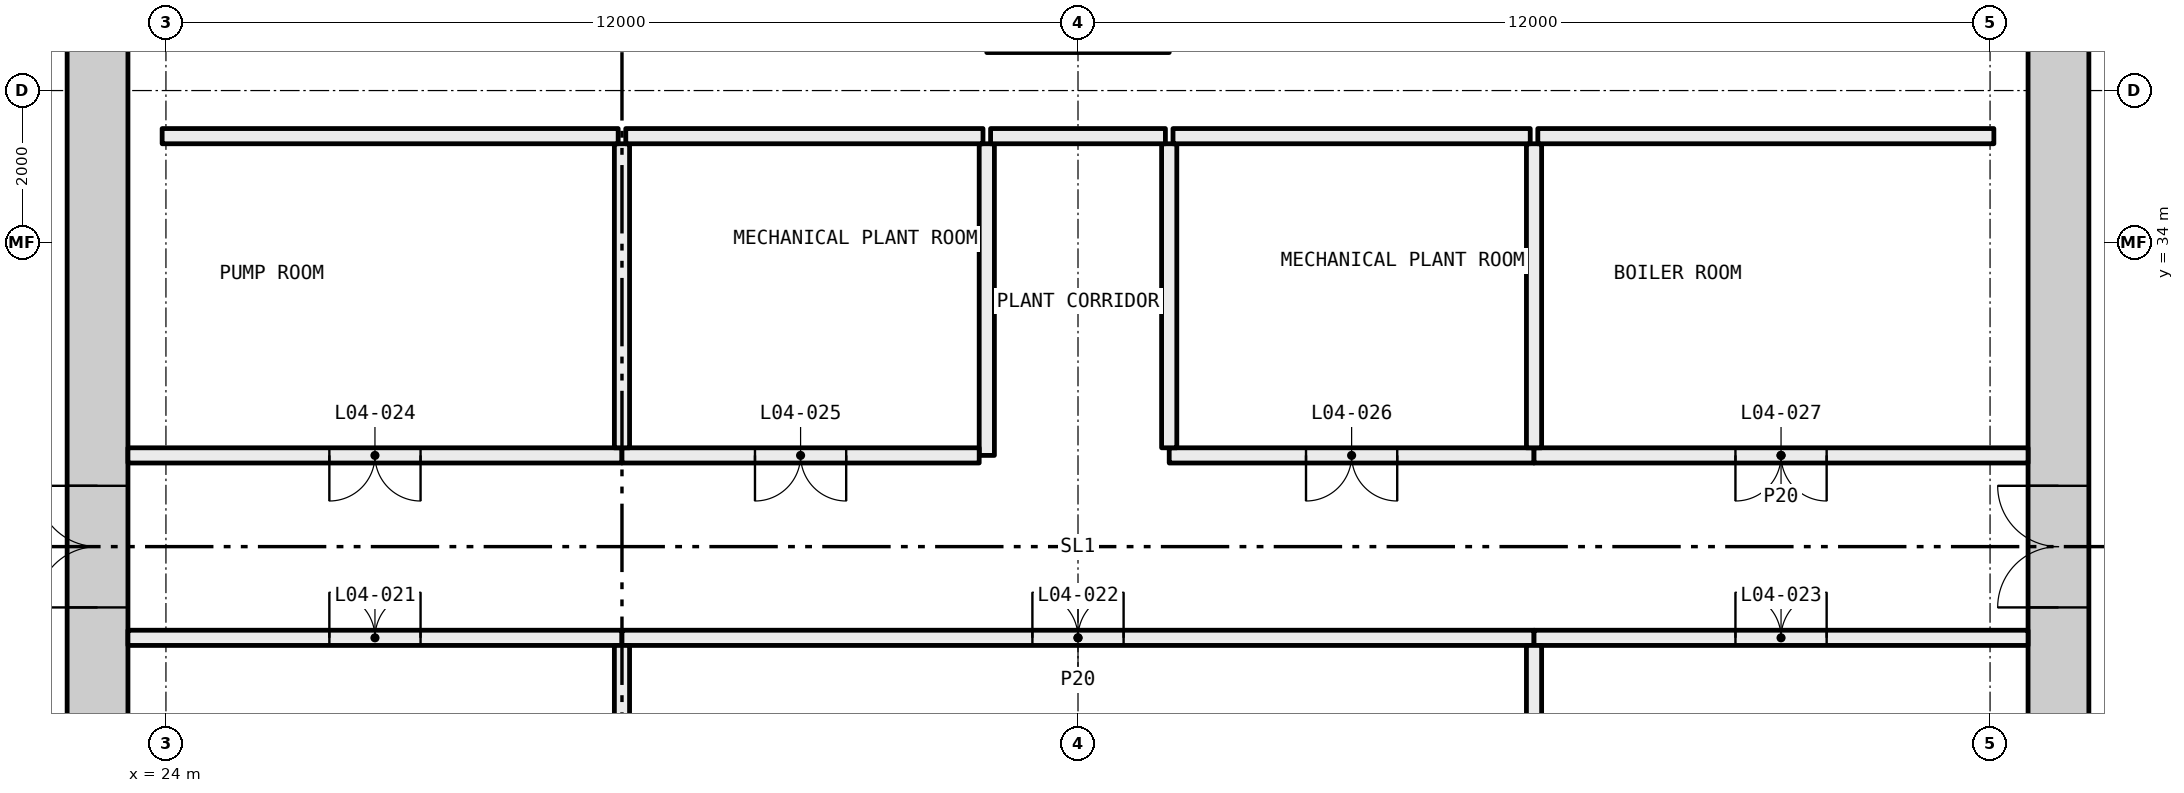
"""IFC4 building model, lengths in metres.
Left out: names, types, materials, properties, quantities, classifications, styles, units other than length and angle.
Written with IfcOpenShell. Run it as: python <this file> out.ifc"""

import sys

from ifc_helpers import new_model, si_unit, direction, frame, frame_2d, origin, place, context, subcontext, project, spatial, rectangle, extrude, element, fill, save


model = new_model("IFC4")
c1 = context("Model", 3, precision=1e-05, world=origin(), true_north=direction((0.0, 1.0)))
c2 = subcontext(c1, "Body", "Model", "MODEL_VIEW")
j1 = project(units=[si_unit("LENGTHUNIT", "METRE"), si_unit("PLANEANGLEUNIT", "RADIAN")], contexts=[c1])
p1 = place(None, origin())
s1 = spatial("IfcSite", under=j1, at=p1, CompositionType="ELEMENT")
p2 = place(p1, origin())
s2 = spatial("IfcBuilding", under=s1, at=p2, CompositionType="ELEMENT")
p3 = place(p2, frame((0.0, 0.0, 24.0)))
s3 = spatial("IfcBuildingStorey", under=s2, at=p3, CompositionType="ELEMENT", Elevation=24.0)
p4 = place(p3, frame((23.5, 28.8, 0.0), z_axis=(0.0, 0.0, 1.0), x_axis=(1.0, 0.0, 0.0)))
e1 = element("IfcWall", 1, at=p4, inside=s3, PredefinedType="PARTITIONING", context=c2, shape_type="SweptSolid", body=[
    extrude(rectangle(XDim=6.5, YDim=0.2, at=frame_2d((3.25, 0.0))), origin(), (0.0, 0.0, 1.0), 5.6),
])
p5 = place(p4, frame((2.65, 0.0, 0.0)))
e2 = element("IfcOpeningElement", 2, at=p5, cuts=e1, PredefinedType="OPENING", context=c2, shape_type="SweptSolid", body=[
    extrude(rectangle(XDim=1.2, YDim=2.1, at=frame_2d((0.6, 1.05))), frame((0.0, 0.11, 0.0), z_axis=(0.0, -1.0, 0.0), x_axis=(1.0, 0.0, 0.0)), (0.0, 0.0, 1.0), 0.22),
])
p6 = place(p3, frame((30.0, 28.8, 0.0), z_axis=(0.0, 0.0, 1.0), x_axis=(1.0, 0.0, 0.0)))
e3 = element("IfcWall", 3, at=p6, inside=s3, PredefinedType="PARTITIONING", context=c2, shape_type="SweptSolid", body=[
    extrude(rectangle(XDim=12.0, YDim=0.2, at=frame_2d((6.0, 0.0))), origin(), (0.0, 0.0, 1.0), 5.6),
])
p7 = place(p6, frame((5.4, 0.0, 0.0)))
e4 = element("IfcOpeningElement", 4, at=p7, cuts=e3, PredefinedType="OPENING", context=c2, shape_type="SweptSolid", body=[
    extrude(rectangle(XDim=1.2, YDim=2.1, at=frame_2d((0.6, 1.05))), frame((0.0, 0.11, 0.0), z_axis=(0.0, -1.0, 0.0), x_axis=(1.0, 0.0, 0.0)), (0.0, 0.0, 1.0), 0.22),
])
p8 = place(p3, frame((42.0, 28.8, 0.0), z_axis=(0.0, 0.0, 1.0), x_axis=(1.0, 0.0, 0.0)))
e5 = element("IfcWall", 5, at=p8, inside=s3, PredefinedType="PARTITIONING", context=c2, shape_type="SweptSolid", body=[
    extrude(rectangle(XDim=6.5, YDim=0.2, at=frame_2d((3.25, 0.0))), origin(), (0.0, 0.0, 1.0), 5.6),
])
p9 = place(p8, frame((2.65, 0.0, 0.0)))
e6 = element("IfcOpeningElement", 6, at=p9, cuts=e5, PredefinedType="OPENING", context=c2, shape_type="SweptSolid", body=[
    extrude(rectangle(XDim=1.2, YDim=2.1, at=frame_2d((0.6, 1.05))), frame((0.0, 0.11, 0.0), z_axis=(0.0, -1.0, 0.0), x_axis=(1.0, 0.0, 0.0)), (0.0, 0.0, 1.0), 0.22),
])
p10 = place(p3, frame((30.0, 31.2, 0.0), z_axis=(0.0, 0.0, 1.0), x_axis=(-1.0, 0.0, 0.0)))
e7 = element("IfcWall", 7, at=p10, inside=s3, PredefinedType="PARTITIONING", context=c2, shape_type="SweptSolid", body=[
    extrude(rectangle(XDim=6.5, YDim=0.2, at=frame_2d((3.25, 0.0))), origin(), (0.0, 0.0, 1.0), 5.6),
])
p11 = place(p10, frame((2.65, 0.0, 0.0)))
e8 = element("IfcOpeningElement", 8, at=p11, cuts=e7, PredefinedType="OPENING", context=c2, shape_type="SweptSolid", body=[
    extrude(rectangle(XDim=1.2, YDim=2.1, at=frame_2d((0.6, 1.05))), frame((0.0, 0.11, 0.0), z_axis=(0.0, -1.0, 0.0), x_axis=(1.0, 0.0, 0.0)), (0.0, 0.0, 1.0), 0.22),
])
p12 = place(p3, frame((34.8, 35.3, 0.0), z_axis=(0.0, 0.0, 1.0), x_axis=(0.0, -1.0, 0.0)))
e9 = element("IfcWall", 9, at=p12, inside=s3, PredefinedType="PARTITIONING", context=c2, shape_type="SweptSolid", body=[
    extrude(rectangle(XDim=4.1, YDim=0.2, at=frame_2d((2.05, 0.0))), origin(), (0.0, 0.0, 1.0), 5.6),
])
p13 = place(p3, frame((34.7, 31.2, 0.0), z_axis=(0.0, 0.0, 1.0), x_axis=(-1.0, 0.0, 0.0)))
e10 = element("IfcWall", 10, at=p13, inside=s3, PredefinedType="PARTITIONING", context=c2, shape_type="SweptSolid", body=[
    extrude(rectangle(XDim=4.7, YDim=0.2, at=frame_2d((2.35, 0.0))), origin(), (0.0, 0.0, 1.0), 5.6),
])
p14 = place(p13, frame((1.75, 0.0, 0.0)))
e11 = element("IfcOpeningElement", 11, at=p14, cuts=e10, PredefinedType="OPENING", context=c2, shape_type="SweptSolid", body=[
    extrude(rectangle(XDim=1.2, YDim=2.1, at=frame_2d((0.6, 1.05))), frame((0.0, 0.11, 0.0), z_axis=(0.0, -1.0, 0.0), x_axis=(1.0, 0.0, 0.0)), (0.0, 0.0, 1.0), 0.22),
])
p15 = place(p3, frame((42.0, 31.2, 0.0), z_axis=(0.0, 0.0, 1.0), x_axis=(-1.0, 0.0, 0.0)))
e12 = element("IfcWall", 12, at=p15, inside=s3, PredefinedType="PARTITIONING", context=c2, shape_type="SweptSolid", body=[
    extrude(rectangle(XDim=4.8, YDim=0.2, at=frame_2d((2.4, 0.0))), origin(), (0.0, 0.0, 1.0), 5.6),
])
p16 = place(p15, frame((1.8, 0.0, 0.0)))
e13 = element("IfcOpeningElement", 13, at=p16, cuts=e12, PredefinedType="OPENING", context=c2, shape_type="SweptSolid", body=[
    extrude(rectangle(XDim=1.2, YDim=2.1, at=frame_2d((0.6, 1.05))), frame((0.0, 0.11, 0.0), z_axis=(0.0, -1.0, 0.0), x_axis=(1.0, 0.0, 0.0)), (0.0, 0.0, 1.0), 0.22),
])
p17 = place(p3, frame((37.2, 31.3, 0.0), z_axis=(0.0, 0.0, 1.0), x_axis=(0.0, 1.0, 0.0)))
e14 = element("IfcWall", 14, at=p17, inside=s3, PredefinedType="PARTITIONING", context=c2, shape_type="SweptSolid", body=[
    extrude(rectangle(XDim=4.0, YDim=0.2, at=frame_2d((2.0, 0.0))), origin(), (0.0, 0.0, 1.0), 5.6),
])
p18 = place(p3, frame((48.5, 31.2, 0.0), z_axis=(0.0, 0.0, 1.0), x_axis=(-1.0, 0.0, 0.0)))
e15 = element("IfcWall", 15, at=p18, inside=s3, PredefinedType="PARTITIONING", context=c2, shape_type="SweptSolid", body=[
    extrude(rectangle(XDim=6.5, YDim=0.2, at=frame_2d((3.25, 0.0))), origin(), (0.0, 0.0, 1.0), 5.6),
])
p19 = place(p18, frame((2.65, 0.0, 0.0)))
e16 = element("IfcOpeningElement", 16, at=p19, cuts=e15, PredefinedType="OPENING", context=c2, shape_type="SweptSolid", body=[
    extrude(rectangle(XDim=1.2, YDim=2.1, at=frame_2d((0.6, 1.05))), frame((0.0, 0.11, 0.0), z_axis=(0.0, -1.0, 0.0), x_axis=(1.0, 0.0, 0.0)), (0.0, 0.0, 1.0), 0.22),
])
for number, where, z_axis, x_axis in (
    (17, (30.0, 24.7, 0.0), (0.0, 0.0, 1.0), (0.0, 1.0, 0.0)),
    (18, (42.0, 24.7, 0.0), (0.0, 0.0, 1.0), (0.0, 1.0, 0.0)),
    (19, (30.0, 31.3, 0.0), (0.0, 0.0, 1.0), (0.0, 1.0, 0.0)),
    (20, (42.0, 31.3, 0.0), (0.0, 0.0, 1.0), (0.0, 1.0, 0.0)),
):
    element("IfcWall", number, at=place(p3, frame(where, z_axis=z_axis, x_axis=x_axis)), inside=s3, PredefinedType="PARTITIONING", context=c2, shape_type="SweptSolid", body=[
        extrude(rectangle(XDim=4.0, YDim=0.2, at=frame_2d((2.0, 0.0))), origin(), (0.0, 0.0, 1.0), 5.6),
    ])
p20 = place(p3, frame((37.15, 35.4, 0.0), z_axis=(0.0, 0.0, 1.0), x_axis=(-1.0, 0.0, 0.0)))
e21 = element("IfcWall", 21, at=p20, inside=s3, PredefinedType="PARTITIONING", context=c2, shape_type="SweptSolid", body=[
    extrude(rectangle(XDim=2.3, YDim=0.2, at=frame_2d((1.15, 0.0))), origin(), (0.0, 0.0, 1.0), 5.6),
])
p21 = place(p3, frame((29.95, 35.4, 0.0), z_axis=(0.0, 0.0, 1.0), x_axis=(-1.0, 0.0, 0.0)))
e22 = element("IfcWall", 22, at=p21, inside=s3, PredefinedType="PARTITIONING", context=c2, shape_type="SweptSolid", body=[
    extrude(rectangle(XDim=6.0, YDim=0.2, at=frame_2d((3.0, 0.0))), origin(), (0.0, 0.0, 1.0), 5.6),
])
for number, where, z_axis, x_axis in (
    (23, (34.75, 35.4, 0.0), (0.0, 0.0, 1.0), (-1.0, 0.0, 0.0)),
    (24, (41.95, 35.4, 0.0), (0.0, 0.0, 1.0), (-1.0, 0.0, 0.0)),
):
    element("IfcWall", number, at=place(p3, frame(where, z_axis=z_axis, x_axis=x_axis)), inside=s3, PredefinedType="PARTITIONING", context=c2, shape_type="SweptSolid", body=[
        extrude(rectangle(XDim=4.7, YDim=0.2, at=frame_2d((2.35, 0.0))), origin(), (0.0, 0.0, 1.0), 5.6),
    ])
p22 = place(p3, frame((48.05, 35.4, 0.0), z_axis=(0.0, 0.0, 1.0), x_axis=(-1.0, 0.0, 0.0)))
e25 = element("IfcWall", 25, at=p22, inside=s3, PredefinedType="PARTITIONING", context=c2, shape_type="SweptSolid", body=[
    extrude(rectangle(XDim=6.0, YDim=0.2, at=frame_2d((3.0, 0.0))), origin(), (0.0, 0.0, 1.0), 5.6),
])
p23 = place(p3, frame((23.1, 22.3, 0.0), z_axis=(0.0, 0.0, 1.0), x_axis=(0.0, 1.0, 0.0)))
e26 = element("IfcWall", 26, at=p23, inside=s3, PredefinedType="SHEAR", context=c2, shape_type="SweptSolid", body=[
    extrude(rectangle(XDim=15.4, YDim=0.8, at=frame_2d((7.7, 0.0))), origin(), (0.0, 0.0, 1.0), 5.6),
])
p24 = place(p23, frame((6.9, 0.0, 0.0)))
e27 = element("IfcOpeningElement", 27, at=p24, cuts=e26, PredefinedType="OPENING", context=c2, shape_type="SweptSolid", body=[
    extrude(rectangle(XDim=1.6, YDim=2.1, at=frame_2d((0.8, 1.05))), frame((0.0, 0.41, 0.0), z_axis=(0.0, -1.0, 0.0), x_axis=(1.0, 0.0, 0.0)), (0.0, 0.0, 1.0), 0.82),
])
p25 = place(p3, frame((48.9, 22.3, 0.0), z_axis=(0.0, 0.0, 1.0), x_axis=(0.0, 1.0, 0.0)))
e28 = element("IfcWall", 28, at=p25, inside=s3, PredefinedType="SHEAR", context=c2, shape_type="SweptSolid", body=[
    extrude(rectangle(XDim=15.4, YDim=0.8, at=frame_2d((7.7, 0.0))), origin(), (0.0, 0.0, 1.0), 5.6),
])
p26 = place(p25, frame((6.9, 0.0, 0.0)))
e29 = element("IfcOpeningElement", 29, at=p26, cuts=e28, PredefinedType="OPENING", context=c2, shape_type="SweptSolid", body=[
    extrude(rectangle(XDim=1.6, YDim=2.1, at=frame_2d((0.8, 1.05))), frame((0.0, 0.41, 0.0), z_axis=(0.0, -1.0, 0.0), x_axis=(1.0, 0.0, 0.0)), (0.0, 0.0, 1.0), 0.82),
])
p27 = place(p5, origin())
e30 = element("IfcDoor", 30, at=p27, inside=s3, OperationType="DOUBLE_DOOR_SINGLE_SWING", PredefinedType="DOOR", context=c2, shape_type="SweptSolid", body=[
    extrude(rectangle(XDim=1.2, YDim=2.1, at=frame_2d((0.6, 1.05))), frame((0.0, 0.025, 0.0), z_axis=(0.0, -1.0, 0.0), x_axis=(1.0, 0.0, 0.0)), (0.0, 0.0, 1.0), 0.05),
])
fill(e2, e30)
p28 = place(p7, origin())
e31 = element("IfcDoor", 31, at=p28, inside=s3, OperationType="DOUBLE_DOOR_SINGLE_SWING", PredefinedType="DOOR", context=c2, shape_type="SweptSolid", body=[
    extrude(rectangle(XDim=1.2, YDim=2.1, at=frame_2d((0.6, 1.05))), frame((0.0, 0.025, 0.0), z_axis=(0.0, -1.0, 0.0), x_axis=(1.0, 0.0, 0.0)), (0.0, 0.0, 1.0), 0.05),
])
fill(e4, e31)
p29 = place(p9, origin())
e32 = element("IfcDoor", 32, at=p29, inside=s3, OperationType="DOUBLE_DOOR_SINGLE_SWING", PredefinedType="DOOR", context=c2, shape_type="SweptSolid", body=[
    extrude(rectangle(XDim=1.2, YDim=2.1, at=frame_2d((0.6, 1.05))), frame((0.0, 0.025, 0.0), z_axis=(0.0, -1.0, 0.0), x_axis=(1.0, 0.0, 0.0)), (0.0, 0.0, 1.0), 0.05),
])
fill(e6, e32)
p30 = place(p11, origin())
e33 = element("IfcDoor", 33, at=p30, inside=s3, OperationType="DOUBLE_DOOR_SINGLE_SWING", PredefinedType="DOOR", context=c2, shape_type="SweptSolid", body=[
    extrude(rectangle(XDim=1.2, YDim=2.1, at=frame_2d((0.6, 1.05))), frame((0.0, 0.025, 0.0), z_axis=(0.0, -1.0, 0.0), x_axis=(1.0, 0.0, 0.0)), (0.0, 0.0, 1.0), 0.05),
])
fill(e8, e33)
p31 = place(p14, origin())
e34 = element("IfcDoor", 34, at=p31, inside=s3, OperationType="DOUBLE_DOOR_SINGLE_SWING", PredefinedType="DOOR", context=c2, shape_type="SweptSolid", body=[
    extrude(rectangle(XDim=1.2, YDim=2.1, at=frame_2d((0.6, 1.05))), frame((0.0, 0.025, 0.0), z_axis=(0.0, -1.0, 0.0), x_axis=(1.0, 0.0, 0.0)), (0.0, 0.0, 1.0), 0.05),
])
fill(e11, e34)
p32 = place(p16, origin())
e35 = element("IfcDoor", 35, at=p32, inside=s3, OperationType="DOUBLE_DOOR_SINGLE_SWING", PredefinedType="DOOR", context=c2, shape_type="SweptSolid", body=[
    extrude(rectangle(XDim=1.2, YDim=2.1, at=frame_2d((0.6, 1.05))), frame((0.0, 0.025, 0.0), z_axis=(0.0, -1.0, 0.0), x_axis=(1.0, 0.0, 0.0)), (0.0, 0.0, 1.0), 0.05),
])
fill(e13, e35)
p33 = place(p19, origin())
e36 = element("IfcDoor", 36, at=p33, inside=s3, OperationType="DOUBLE_DOOR_SINGLE_SWING", PredefinedType="DOOR", context=c2, shape_type="SweptSolid", body=[
    extrude(rectangle(XDim=1.2, YDim=2.1, at=frame_2d((0.6, 1.05))), frame((0.0, 0.025, 0.0), z_axis=(0.0, -1.0, 0.0), x_axis=(1.0, 0.0, 0.0)), (0.0, 0.0, 1.0), 0.05),
])
fill(e16, e36)
p34 = place(p24, origin())
e37 = element("IfcDoor", 37, at=p34, inside=s3, OperationType="DOUBLE_DOOR_SINGLE_SWING", PredefinedType="DOOR", context=c2, shape_type="SweptSolid", body=[
    extrude(rectangle(XDim=1.6, YDim=2.1, at=frame_2d((0.8, 1.05))), frame((0.0, 0.025, 0.0), z_axis=(0.0, -1.0, 0.0), x_axis=(1.0, 0.0, 0.0)), (0.0, 0.0, 1.0), 0.05),
])
fill(e27, e37)
p35 = place(p26, origin())
e38 = element("IfcDoor", 38, at=p35, inside=s3, OperationType="DOUBLE_DOOR_SINGLE_SWING", PredefinedType="DOOR", context=c2, shape_type="SweptSolid", body=[
    extrude(rectangle(XDim=1.6, YDim=2.1, at=frame_2d((0.8, 1.05))), frame((0.0, 0.025, 0.0), z_axis=(0.0, -1.0, 0.0), x_axis=(1.0, 0.0, 0.0)), (0.0, 0.0, 1.0), 0.05),
])
fill(e29, e38)
save(model, sys.argv[1])
